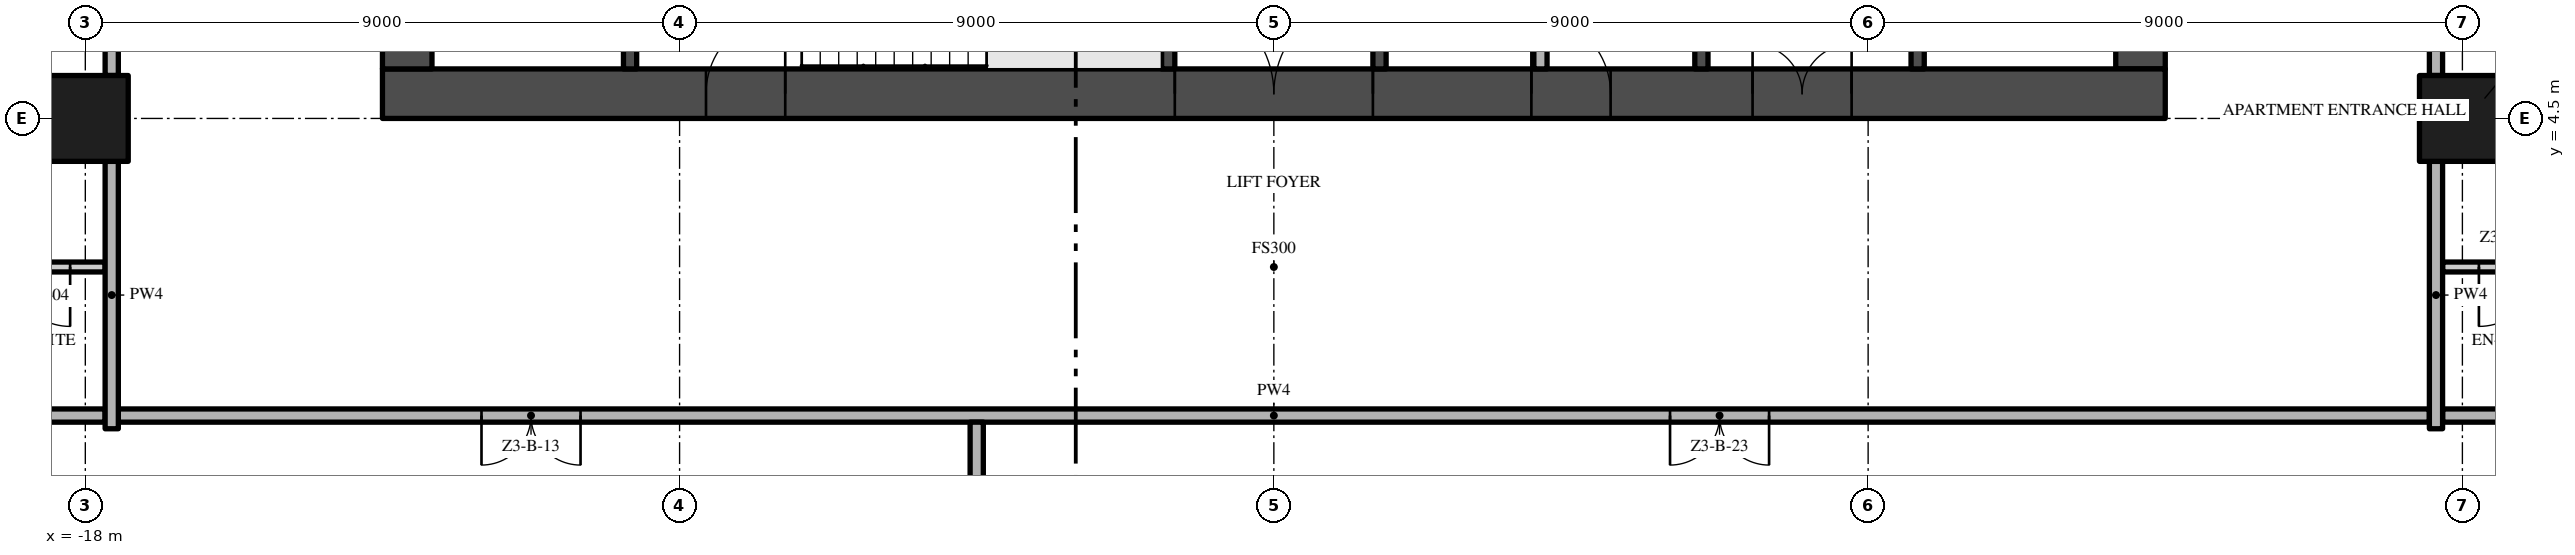
"""IFC4 building model, lengths in metres.
Left out: names, types, materials, properties, quantities, classifications, styles, units other than length and angle.
Written with IfcOpenShell. Run it as: python <this file> out.ifc"""

import sys

from ifc_helpers import new_model, si_unit, direction, frame, frame_2d, origin, origin_2d, place, context, subcontext, project, spatial, rectangle, extrude, element, fill, save


model = new_model("IFC4")
c1 = context("Model", 3, precision=1e-05, world=origin(), true_north=direction((0.0, 1.0)))
c2 = subcontext(c1, "Body", "Model", "MODEL_VIEW")
j1 = project(units=[si_unit("LENGTHUNIT", "METRE"), si_unit("PLANEANGLEUNIT", "RADIAN")], contexts=[c1])
p1 = place(None, origin())
s1 = spatial("IfcSite", under=j1, at=p1, CompositionType="ELEMENT")
p2 = place(p1, origin())
s2 = spatial("IfcBuilding", under=s1, at=p2, CompositionType="ELEMENT")
p3 = place(p2, frame((0.0, 0.0, 136.4)))
s3 = spatial("IfcBuildingStorey", under=s2, at=p3, CompositionType="ELEMENT", Elevation=136.4)
p4 = place(p3, frame((-13.5, 4.875, -0.3), z_axis=(0.0, 0.0, 1.0), x_axis=(1.0, 0.0, 0.0)))
e1 = element("IfcWall", 1, at=p4, inside=s3, PredefinedType="SHEAR", context=c2, shape_type="SweptSolid", body=[
    extrude(rectangle(XDim=27.0, YDim=0.75, at=frame_2d((13.5, 0.0))), origin(), (0.0, 0.0, 1.0), 3.8),
])
p5 = place(p4, frame((12.0, 0.0, 0.3)))
e2 = element("IfcOpeningElement", 2, at=p5, cuts=e1, PredefinedType="OPENING", context=c2, shape_type="SweptSolid", body=[
    extrude(rectangle(XDim=3.0, YDim=2.4, at=frame_2d((1.5, 1.2))), frame((0.0, 0.385, 0.0), z_axis=(0.0, -1.0, 0.0), x_axis=(1.0, 0.0, 0.0)), (0.0, 0.0, 1.0), 0.77),
])
p6 = place(p4, frame((4.9, 0.0, 0.3)))
e3 = element("IfcOpeningElement", 3, at=p6, cuts=e1, PredefinedType="OPENING", context=c2, shape_type="SweptSolid", body=[
    extrude(rectangle(XDim=1.2, YDim=2.2, at=frame_2d((0.6, 1.1))), frame((0.0, 0.385, 0.0), z_axis=(0.0, -1.0, 0.0), x_axis=(1.0, 0.0, 0.0)), (0.0, 0.0, 1.0), 0.77),
])
p7 = place(p4, frame((20.75, 0.0, 0.3)))
e4 = element("IfcOpeningElement", 4, at=p7, cuts=e1, PredefinedType="OPENING", context=c2, shape_type="SweptSolid", body=[
    extrude(rectangle(XDim=1.5, YDim=2.2, at=frame_2d((0.75, 1.1))), frame((0.0, 0.385, 0.0), z_axis=(0.0, -1.0, 0.0), x_axis=(1.0, 0.0, 0.0)), (0.0, 0.0, 1.0), 0.77),
])
p8 = place(p4, frame((17.4, 0.0, 0.3)))
e5 = element("IfcOpeningElement", 5, at=p8, cuts=e1, PredefinedType="OPENING", context=c2, shape_type="SweptSolid", body=[
    extrude(rectangle(XDim=1.2, YDim=2.2, at=frame_2d((0.6, 1.1))), frame((0.0, 0.385, 0.0), z_axis=(0.0, -1.0, 0.0), x_axis=(1.0, 0.0, 0.0)), (0.0, 0.0, 1.0), 0.77),
])
p9 = place(p3, frame((13.125, 5.25, -0.3), z_axis=(0.0, 0.0, 1.0), x_axis=(0.0, 1.0, 0.0)))
e6 = element("IfcWall", 6, at=p9, inside=s3, PredefinedType="SHEAR", context=c2, shape_type="SweptSolid", body=[
    extrude(rectangle(XDim=16.5, YDim=0.75, at=frame_2d((8.25, 0.0))), origin(), (0.0, 0.0, 1.0), 3.8),
])
p10 = place(p9, frame((6.15, 0.0, 0.3)))
e7 = element("IfcOpeningElement", 7, at=p10, cuts=e6, PredefinedType="OPENING", context=c2, shape_type="SweptSolid", body=[
    extrude(rectangle(XDim=1.2, YDim=2.2, at=frame_2d((0.6, 1.1))), frame((0.0, 0.385, 0.0), z_axis=(0.0, -1.0, 0.0), x_axis=(1.0, 0.0, 0.0)), (0.0, 0.0, 1.0), 0.77),
])
p11 = place(p3, frame((-13.125, 21.75, -0.3), z_axis=(0.0, 0.0, 1.0), x_axis=(0.0, -1.0, 0.0)))
e8 = element("IfcWall", 8, at=p11, inside=s3, PredefinedType="SHEAR", context=c2, shape_type="SweptSolid", body=[
    extrude(rectangle(XDim=16.5, YDim=0.75, at=frame_2d((8.25, 0.0))), origin(), (0.0, 0.0, 1.0), 3.8),
])
p12 = place(p11, frame((9.15, 0.0, 0.3)))
e9 = element("IfcOpeningElement", 9, at=p12, cuts=e8, PredefinedType="OPENING", context=c2, shape_type="SweptSolid", body=[
    extrude(rectangle(XDim=1.2, YDim=2.2, at=frame_2d((0.6, 1.1))), frame((0.0, 0.385, 0.0), z_axis=(0.0, -1.0, 0.0), x_axis=(1.0, 0.0, 0.0)), (0.0, 0.0, 1.0), 0.77),
])
for number, where, z_axis, x_axis in (
    (10, (-18.0, 4.5, 0.0), (0.0, 0.0, 1.0), (1.0, 0.0, 0.0)),
    (11, (18.0, 4.5, 0.0), (0.0, 0.0, 1.0), (1.0, 0.0, 0.0)),
):
    element("IfcColumn", number, at=place(p3, frame(where, z_axis=z_axis, x_axis=x_axis)), inside=s3, PredefinedType="COLUMN", context=c2, shape_type="SweptSolid", body=[
        extrude(rectangle(XDim=1.3, YDim=1.3, at=origin_2d()), origin(), (0.0, 0.0, 1.0), 3.5),
    ])
for number, where, z_axis, x_axis in (
    (12, (-9.75, 5.25, 0.0), (0.0, 0.0, 1.0), (0.0, 1.0, 0.0)),
    (13, (-1.6, 5.25, 0.0), (0.0, 0.0, 1.0), (0.0, 1.0, 0.0)),
):
    element("IfcWall", number, at=place(p3, frame(where, z_axis=z_axis, x_axis=x_axis)), inside=s3, PredefinedType="SHEAR", context=c2, shape_type="SweptSolid", body=[
        extrude(rectangle(XDim=2.7, YDim=0.2, at=frame_2d((1.35, 0.0))), origin(), (0.0, 0.0, 1.0), 3.5),
    ])
p13 = place(p3, frame((1.6, 9.8, 0.0), z_axis=(0.0, 0.0, 1.0), x_axis=(0.0, -1.0, 0.0)))
e14 = element("IfcWall", 14, at=p13, inside=s3, PredefinedType="SHEAR", context=c2, shape_type="SweptSolid", body=[
    extrude(rectangle(XDim=4.55, YDim=0.2, at=frame_2d((2.275, 0.0))), origin(), (0.0, 0.0, 1.0), 3.5),
])
p14 = place(p13, frame((1.425, 0.0, 0.0)))
e15 = element("IfcOpeningElement", 15, at=p14, cuts=e14, PredefinedType="OPENING", context=c2, shape_type="SweptSolid", body=[
    extrude(rectangle(XDim=0.9, YDim=2.1, at=frame_2d((0.45, 1.05))), frame((0.0, 0.11, 0.0), z_axis=(0.0, -1.0, 0.0), x_axis=(1.0, 0.0, 0.0)), (0.0, 0.0, 1.0), 0.22),
])
p15 = place(p3, frame((4.037, 9.8, 0.0), z_axis=(0.0, 0.0, 1.0), x_axis=(0.0, -1.0, 0.0)))
e16 = element("IfcWall", 16, at=p15, inside=s3, PredefinedType="PARTITIONING", context=c2, shape_type="SweptSolid", body=[
    extrude(rectangle(XDim=4.55, YDim=0.2, at=frame_2d((2.275, 0.0))), origin(), (0.0, 0.0, 1.0), 3.5),
])
p16 = place(p15, frame((1.825, 0.0, 0.0)))
e17 = element("IfcOpeningElement", 17, at=p16, cuts=e16, PredefinedType="OPENING", context=c2, shape_type="SweptSolid", body=[
    extrude(rectangle(XDim=0.9, YDim=2.1, at=frame_2d((0.45, 1.05))), frame((0.0, 0.11, 0.0), z_axis=(0.0, -1.0, 0.0), x_axis=(1.0, 0.0, 0.0)), (0.0, 0.0, 1.0), 0.22),
])
p17 = place(p3, frame((6.475, 5.25, 0.0), z_axis=(0.0, 0.0, 1.0), x_axis=(0.0, 1.0, 0.0)))
e18 = element("IfcWall", 18, at=p17, inside=s3, PredefinedType="SHEAR", context=c2, shape_type="SweptSolid", body=[
    extrude(rectangle(XDim=4.55, YDim=0.2, at=frame_2d((2.275, 0.0))), origin(), (0.0, 0.0, 1.0), 3.5),
])
p18 = place(p3, frame((9.75, 5.25, 0.0), z_axis=(0.0, 0.0, 1.0), x_axis=(0.0, 1.0, 0.0)))
e19 = element("IfcWall", 19, at=p18, inside=s3, PredefinedType="SHEAR", context=c2, shape_type="SweptSolid", body=[
    extrude(rectangle(XDim=2.35, YDim=0.2, at=frame_2d((1.175, 0.0))), origin(), (0.0, 0.0, 1.0), 3.5),
])
p19 = place(p18, frame((0.7, 0.0, 0.0)))
e20 = element("IfcOpeningElement", 20, at=p19, cuts=e19, PredefinedType="OPENING", context=c2, shape_type="SweptSolid", body=[
    extrude(rectangle(XDim=1.1, YDim=2.1, at=frame_2d((0.55, 1.05))), frame((0.0, 0.11, 0.0), z_axis=(0.0, -1.0, 0.0), x_axis=(1.0, 0.0, 0.0)), (0.0, 0.0, 1.0), 0.22),
])
p20 = place(p3, frame((17.5, 0.0, 0.0), z_axis=(0.0, 0.0, 1.0), x_axis=(-1.0, 0.0, 0.0)))
e21 = element("IfcWall", 21, at=p20, inside=s3, PredefinedType="PARTITIONING", context=c2, shape_type="SweptSolid", body=[
    extrude(rectangle(XDim=35.0, YDim=0.2, at=frame_2d((17.5, 0.0))), origin(), (0.0, 0.0, 1.0), 3.5),
])
p21 = place(p20, frame((28.0, 0.0, 0.0)))
e22 = element("IfcOpeningElement", 22, at=p21, cuts=e21, PredefinedType="OPENING", context=c2, shape_type="SweptSolid", body=[
    extrude(rectangle(XDim=1.5, YDim=2.4, at=frame_2d((0.75, 1.2))), frame((0.0, 0.11, 0.0), z_axis=(0.0, -1.0, 0.0), x_axis=(1.0, 0.0, 0.0)), (0.0, 0.0, 1.0), 0.22),
])
p22 = place(p20, frame((10.0, 0.0, 0.0)))
e23 = element("IfcOpeningElement", 23, at=p22, cuts=e21, PredefinedType="OPENING", context=c2, shape_type="SweptSolid", body=[
    extrude(rectangle(XDim=1.5, YDim=2.4, at=frame_2d((0.75, 1.2))), frame((0.0, 0.11, 0.0), z_axis=(0.0, -1.0, 0.0), x_axis=(1.0, 0.0, 0.0)), (0.0, 0.0, 1.0), 0.22),
])
for number, where, z_axis, x_axis in (
    (24, (-22.2, 0.0, 0.0), (0.0, 0.0, 1.0), (1.0, 0.0, 0.0)),
    (25, (17.7, 0.0, 0.0), (0.0, 0.0, 1.0), (1.0, 0.0, 0.0)),
):
    element("IfcWall", number, at=place(p3, frame(where, z_axis=z_axis, x_axis=x_axis)), inside=s3, PredefinedType="PARTITIONING", context=c2, shape_type="SweptSolid", body=[
        extrude(rectangle(XDim=4.5, YDim=0.2, at=frame_2d((2.25, 0.0))), origin(), (0.0, 0.0, 1.0), 3.5),
    ])
p23 = place(p3, frame((-17.7, 2.25, 0.0), z_axis=(0.0, 0.0, 1.0), x_axis=(-1.0, 0.0, 0.0)))
e26 = element("IfcWall", 26, at=p23, inside=s3, PredefinedType="PARTITIONING", context=c2, shape_type="SweptSolid", body=[
    extrude(rectangle(XDim=2.03, YDim=0.15, at=frame_2d((1.015, 0.0))), origin(), (0.0, 0.0, 1.0), 3.5),
])
p24 = place(p23, frame((0.53, 0.0, 0.0)))
e27 = element("IfcOpeningElement", 27, at=p24, cuts=e26, PredefinedType="OPENING", context=c2, shape_type="SweptSolid", body=[
    extrude(rectangle(XDim=0.9, YDim=2.1, at=frame_2d((0.45, 1.05))), frame((0.0, 0.085, 0.0), z_axis=(0.0, -1.0, 0.0), x_axis=(1.0, 0.0, 0.0)), (0.0, 0.0, 1.0), 0.17),
])
p25 = place(p3, frame((19.73, 2.25, 0.0), z_axis=(0.0, 0.0, 1.0), x_axis=(-1.0, 0.0, 0.0)))
e28 = element("IfcWall", 28, at=p25, inside=s3, PredefinedType="PARTITIONING", context=c2, shape_type="SweptSolid", body=[
    extrude(rectangle(XDim=2.03, YDim=0.15, at=frame_2d((1.015, 0.0))), origin(), (0.0, 0.0, 1.0), 3.5),
])
p26 = place(p25, frame((0.58, 0.0, 0.0)))
e29 = element("IfcOpeningElement", 29, at=p26, cuts=e28, PredefinedType="OPENING", context=c2, shape_type="SweptSolid", body=[
    extrude(rectangle(XDim=0.9, YDim=2.1, at=frame_2d((0.45, 1.05))), frame((0.0, 0.085, 0.0), z_axis=(0.0, -1.0, 0.0), x_axis=(1.0, 0.0, 0.0)), (0.0, 0.0, 1.0), 0.17),
])
p27 = place(p3, frame((-17.6, -0.2, 0.0), z_axis=(0.0, 0.0, 1.0), x_axis=(0.0, 1.0, 0.0)))
e30 = element("IfcWall", 30, at=p27, inside=s3, PredefinedType="PARTITIONING", context=c2, shape_type="SweptSolid", body=[
    extrude(rectangle(XDim=4.05, YDim=0.2, at=frame_2d((2.025, 0.0))), origin(), (0.0, 0.0, 1.0), 3.5),
])
p28 = place(p3, frame((-17.6, 5.15, 0.0), z_axis=(0.0, 0.0, 1.0), x_axis=(0.0, 1.0, 0.0)))
e31 = element("IfcWall", 31, at=p28, inside=s3, PredefinedType="PARTITIONING", context=c2, shape_type="SweptSolid", body=[
    extrude(rectangle(XDim=7.7, YDim=0.2, at=frame_2d((3.85, 0.0))), origin(), (0.0, 0.0, 1.0), 3.5),
])
p29 = place(p28, frame((1.0, 0.0, 0.0)))
e32 = element("IfcOpeningElement", 32, at=p29, cuts=e31, PredefinedType="OPENING", context=c2, shape_type="SweptSolid", body=[
    extrude(rectangle(XDim=1.2, YDim=2.4, at=frame_2d((0.6, 1.2))), frame((0.0, 0.11, 0.0), z_axis=(0.0, -1.0, 0.0), x_axis=(1.0, 0.0, 0.0)), (0.0, 0.0, 1.0), 0.22),
])
p30 = place(p3, frame((-4.5, -17.7, 0.0), z_axis=(0.0, 0.0, 1.0), x_axis=(0.0, 1.0, 0.0)))
e33 = element("IfcWall", 33, at=p30, inside=s3, PredefinedType="PARTITIONING", context=c2, shape_type="SweptSolid", body=[
    extrude(rectangle(XDim=17.6, YDim=0.2, at=frame_2d((8.8, 0.0))), origin(), (0.0, 0.0, 1.0), 3.5),
])
p31 = place(p3, frame((17.6, -0.2, 0.0), z_axis=(0.0, 0.0, 1.0), x_axis=(0.0, 1.0, 0.0)))
e34 = element("IfcWall", 34, at=p31, inside=s3, PredefinedType="PARTITIONING", context=c2, shape_type="SweptSolid", body=[
    extrude(rectangle(XDim=4.05, YDim=0.2, at=frame_2d((2.025, 0.0))), origin(), (0.0, 0.0, 1.0), 3.5),
])
p32 = place(p3, frame((17.6, 12.85, 0.0), z_axis=(0.0, 0.0, 1.0), x_axis=(0.0, -1.0, 0.0)))
e35 = element("IfcWall", 35, at=p32, inside=s3, PredefinedType="PARTITIONING", context=c2, shape_type="SweptSolid", body=[
    extrude(rectangle(XDim=7.7, YDim=0.2, at=frame_2d((3.85, 0.0))), origin(), (0.0, 0.0, 1.0), 3.5),
])
p33 = place(p32, frame((5.5, 0.0, 0.0)))
e36 = element("IfcOpeningElement", 36, at=p33, cuts=e35, PredefinedType="OPENING", context=c2, shape_type="SweptSolid", body=[
    extrude(rectangle(XDim=1.2, YDim=2.4, at=frame_2d((0.6, 1.2))), frame((0.0, 0.11, 0.0), z_axis=(0.0, -1.0, 0.0), x_axis=(1.0, 0.0, 0.0)), (0.0, 0.0, 1.0), 0.22),
])
p34 = place(p5, frame((3.0, 0.0, 0.0), z_axis=(0.0, 0.0, 1.0), x_axis=(-1.0, 0.0, 0.0)))
e37 = element("IfcDoor", 37, at=p34, inside=s3, OperationType="DOUBLE_DOOR_SINGLE_SWING", PredefinedType="DOOR", context=c2, shape_type="SweptSolid", body=[
    extrude(rectangle(XDim=3.0, YDim=2.4, at=frame_2d((1.5, 1.2))), frame((0.0, 0.025, 0.0), z_axis=(0.0, -1.0, 0.0), x_axis=(1.0, 0.0, 0.0)), (0.0, 0.0, 1.0), 0.05),
])
fill(e2, e37)
p35 = place(p6, frame((1.2, 0.0, 0.0), z_axis=(0.0, 0.0, 1.0), x_axis=(-1.0, 0.0, 0.0)))
e38 = element("IfcDoor", 38, at=p35, inside=s3, OperationType="SINGLE_SWING_LEFT", PredefinedType="DOOR", context=c2, shape_type="SweptSolid", body=[
    extrude(rectangle(XDim=1.2, YDim=2.2, at=frame_2d((0.6, 1.1))), frame((0.0, 0.025, 0.0), z_axis=(0.0, -1.0, 0.0), x_axis=(1.0, 0.0, 0.0)), (0.0, 0.0, 1.0), 0.05),
])
fill(e3, e38)
p36 = place(p7, frame((1.5, 0.0, 0.0), z_axis=(0.0, 0.0, 1.0), x_axis=(-1.0, 0.0, 0.0)))
e39 = element("IfcDoor", 39, at=p36, inside=s3, OperationType="DOUBLE_DOOR_SINGLE_SWING", PredefinedType="DOOR", context=c2, shape_type="SweptSolid", body=[
    extrude(rectangle(XDim=1.5, YDim=2.2, at=frame_2d((0.75, 1.1))), frame((0.0, 0.025, 0.0), z_axis=(0.0, -1.0, 0.0), x_axis=(1.0, 0.0, 0.0)), (0.0, 0.0, 1.0), 0.05),
])
fill(e4, e39)
p37 = place(p8, frame((1.2, 0.0, 0.0), z_axis=(0.0, 0.0, 1.0), x_axis=(-1.0, 0.0, 0.0)))
e40 = element("IfcDoor", 40, at=p37, inside=s3, OperationType="SINGLE_SWING_RIGHT", PredefinedType="DOOR", context=c2, shape_type="SweptSolid", body=[
    extrude(rectangle(XDim=1.2, YDim=2.2, at=frame_2d((0.6, 1.1))), frame((0.0, 0.025, 0.0), z_axis=(0.0, -1.0, 0.0), x_axis=(1.0, 0.0, 0.0)), (0.0, 0.0, 1.0), 0.05),
])
fill(e5, e40)
p38 = place(p24, origin())
e41 = element("IfcDoor", 41, at=p38, inside=s3, OperationType="SINGLE_SWING_LEFT", PredefinedType="DOOR", context=c2, shape_type="SweptSolid", body=[
    extrude(rectangle(XDim=0.9, YDim=2.1, at=frame_2d((0.45, 1.05))), frame((0.0, 0.025, 0.0), z_axis=(0.0, -1.0, 0.0), x_axis=(1.0, 0.0, 0.0)), (0.0, 0.0, 1.0), 0.05),
])
fill(e27, e41)
p39 = place(p26, origin())
e42 = element("IfcDoor", 42, at=p39, inside=s3, OperationType="SINGLE_SWING_RIGHT", PredefinedType="DOOR", context=c2, shape_type="SweptSolid", body=[
    extrude(rectangle(XDim=0.9, YDim=2.1, at=frame_2d((0.45, 1.05))), frame((0.0, 0.025, 0.0), z_axis=(0.0, -1.0, 0.0), x_axis=(1.0, 0.0, 0.0)), (0.0, 0.0, 1.0), 0.05),
])
fill(e29, e42)
p40 = place(p21, origin())
e43 = element("IfcDoor", 43, at=p40, inside=s3, OperationType="DOUBLE_DOOR_SINGLE_SWING", PredefinedType="DOOR", context=c2, shape_type="SweptSolid", body=[
    extrude(rectangle(XDim=1.5, YDim=2.4, at=frame_2d((0.75, 1.2))), frame((0.0, 0.025, 0.0), z_axis=(0.0, -1.0, 0.0), x_axis=(1.0, 0.0, 0.0)), (0.0, 0.0, 1.0), 0.05),
])
fill(e22, e43)
p41 = place(p22, origin())
e44 = element("IfcDoor", 44, at=p41, inside=s3, OperationType="DOUBLE_DOOR_SINGLE_SWING", PredefinedType="DOOR", context=c2, shape_type="SweptSolid", body=[
    extrude(rectangle(XDim=1.5, YDim=2.4, at=frame_2d((0.75, 1.2))), frame((0.0, 0.025, 0.0), z_axis=(0.0, -1.0, 0.0), x_axis=(1.0, 0.0, 0.0)), (0.0, 0.0, 1.0), 0.05),
])
fill(e23, e44)
save(model, sys.argv[1])
